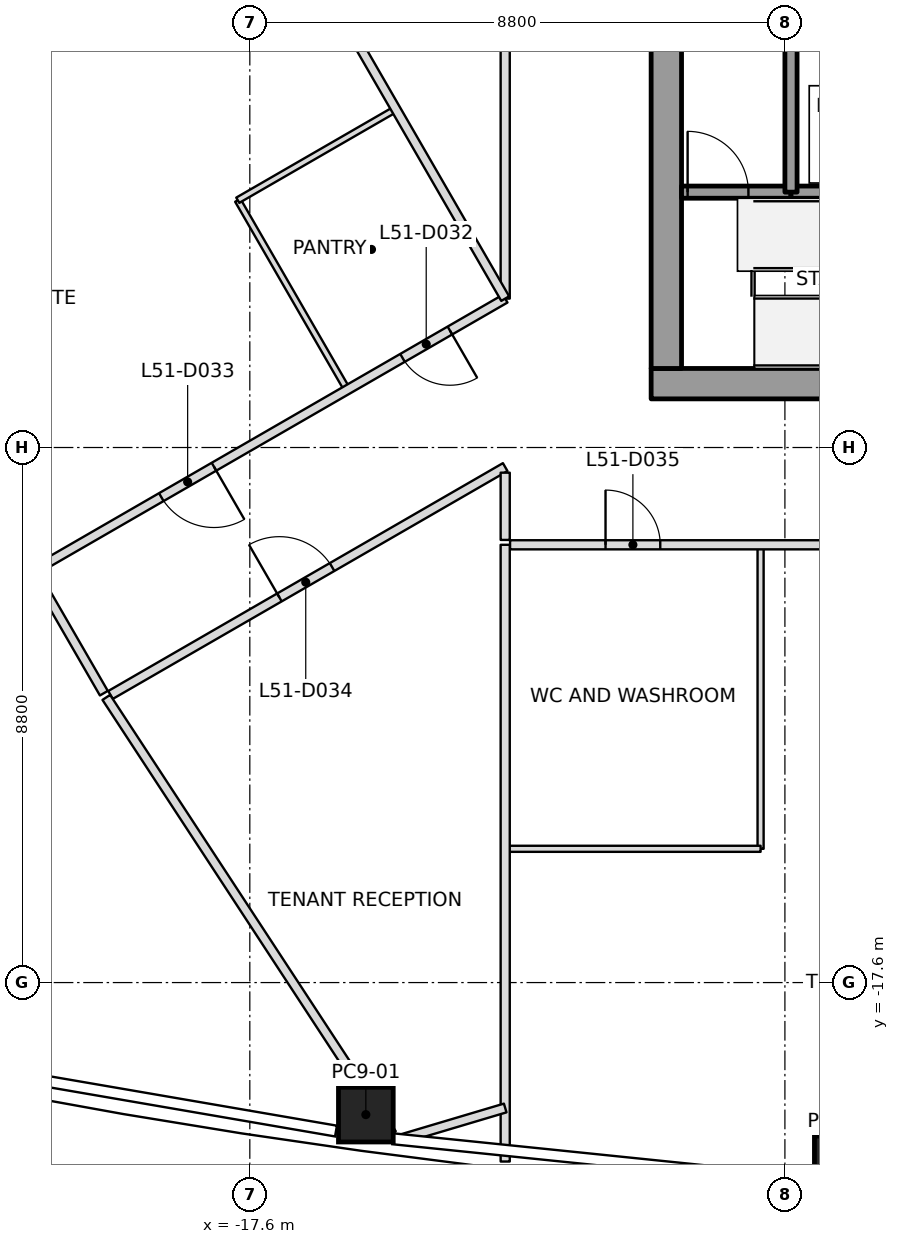
"""IFC4 building model, lengths in metres.
Left out: names, types, materials, properties, quantities, classifications, styles, units other than length and angle.
Written with IfcOpenShell. Run it as: python <this file> out.ifc"""

import sys

from ifc_helpers import new_model, si_unit, direction, frame, frame_2d, origin, origin_2d, place, context, subcontext, project, spatial, rectangle, extrude, element, fill, save


model = new_model("IFC4")
c1 = context("Model", 3, precision=1e-05, world=origin(), true_north=direction((0.0, 1.0)))
c2 = subcontext(c1, "Body", "Model", "MODEL_VIEW")
j1 = project(units=[si_unit("LENGTHUNIT", "METRE"), si_unit("PLANEANGLEUNIT", "RADIAN")], contexts=[c1])
p1 = place(None, origin())
s1 = spatial("IfcSite", under=j1, at=p1, CompositionType="ELEMENT")
p2 = place(p1, origin())
s2 = spatial("IfcBuilding", under=s1, at=p2, CompositionType="ELEMENT")
p3 = place(p2, frame((0.0, 0.0, 231.0)))
s3 = spatial("IfcBuildingStorey", under=s2, at=p3, CompositionType="ELEMENT", Elevation=231.0)
p4 = place(p3, frame((-15.692, -19.772, 0.0), z_axis=(0.017574453011, 0.010434831475, 0.999791104628), x_axis=(-0.990574210989, 0.13604032423, 0.015992582844)))
e1 = element("IfcColumn", 1, at=p4, inside=s3, PredefinedType="COLUMN", context=c2, shape_type="SweptSolid", body=[
    extrude(rectangle(XDim=0.9, YDim=0.9, at=origin_2d()), origin(), (0.0, 0.0, 1.0), 4.001),
])
p5 = place(p3, frame((-7.864, -20.575, 0.0), z_axis=(0.008788174922, 0.01116830563, 0.999899013366), x_axis=(-0.997640525567, 0.068185585075, 0.008006730567)))
e2 = element("IfcColumn", 2, at=p5, inside=s3, PredefinedType="COLUMN", context=c2, shape_type="SweptSolid", body=[
    extrude(rectangle(XDim=0.9, YDim=0.9, at=origin_2d()), origin(), (0.0, 0.0, 1.0), 4.0),
])
p6 = place(p3, frame((-11.0, -7.75, 0.0), z_axis=(0.0, 0.0, 1.0), x_axis=(1.0, 0.0, 0.0)))
e3 = element("IfcWall", 3, at=p6, inside=s3, PredefinedType="SHEAR", context=c2, shape_type="SweptSolid", body=[
    extrude(rectangle(XDim=22.0, YDim=0.5, at=frame_2d((11.0, 0.0))), origin(), (0.0, 0.0, 1.0), 4.0),
])
p7 = place(p6, frame((10.45, 0.0, 0.0)))
e4 = element("IfcOpeningElement", 4, at=p7, cuts=e3, PredefinedType="OPENING", context=c2, shape_type="SweptSolid", body=[
    extrude(rectangle(XDim=1.1, YDim=2.1, at=frame_2d((0.55, 1.05))), frame((0.0, 0.25, 0.0), z_axis=(0.0, -1.0, 0.0), x_axis=(1.0, 0.0, 0.0)), (0.0, 0.0, 1.0), 0.5),
])
p8 = place(p3, frame((-10.75, -7.5, 0.0), z_axis=(0.0, 0.0, 1.0), x_axis=(0.0, 1.0, 0.0)))
e5 = element("IfcWall", 5, at=p8, inside=s3, PredefinedType="SHEAR", context=c2, shape_type="SweptSolid", body=[
    extrude(rectangle(XDim=15.0, YDim=0.5, at=frame_2d((7.5, 0.0))), origin(), (0.0, 0.0, 1.0), 4.0),
])
p9 = place(p8, frame((6.6, 0.0, 0.0)))
e6 = element("IfcOpeningElement", 6, at=p9, cuts=e5, PredefinedType="OPENING", context=c2, shape_type="SweptSolid", body=[
    extrude(rectangle(XDim=1.8, YDim=2.1, at=frame_2d((0.9, 1.05))), frame((0.0, 0.25, 0.0), z_axis=(0.0, -1.0, 0.0), x_axis=(1.0, 0.0, 0.0)), (0.0, 0.0, 1.0), 0.5),
])
p10 = place(p3, frame((-10.5, -4.6, 0.0), z_axis=(0.0, 0.0, 1.0), x_axis=(1.0, 0.0, 0.0)))
e7 = element("IfcWall", 7, at=p10, inside=s3, PredefinedType="SOLIDWALL", context=c2, shape_type="SweptSolid", body=[
    extrude(rectangle(XDim=1.8, YDim=0.2, at=frame_2d((0.9, 0.0))), origin(), (0.0, 0.0, 1.0), 3.85),
])
p11 = place(p10, frame((0.1, 0.0, 0.0)))
e8 = element("IfcOpeningElement", 8, at=p11, cuts=e7, PredefinedType="OPENING", context=c2, shape_type="SweptSolid", body=[
    extrude(rectangle(XDim=1.0, YDim=2.1, at=frame_2d((0.5, 1.05))), frame((0.0, 0.1, 0.0), z_axis=(0.0, -1.0, 0.0), x_axis=(1.0, 0.0, 0.0)), (0.0, 0.0, 1.0), 0.2),
])
p12 = place(p3, frame((-8.7, -4.6, 0.0), z_axis=(0.0, 0.0, 1.0), x_axis=(1.0, 0.0, 0.0)))
e9 = element("IfcWall", 9, at=p12, inside=s3, PredefinedType="SOLIDWALL", context=c2, shape_type="SweptSolid", body=[
    extrude(rectangle(XDim=2.6, YDim=0.2, at=frame_2d((1.3, 0.0))), origin(), (0.0, 0.0, 1.0), 3.85),
])
p13 = place(p3, frame((-8.7, -4.6, 0.0), z_axis=(0.0, 0.0, 1.0), x_axis=(0.0, 1.0, 0.0)))
e10 = element("IfcWall", 10, at=p13, inside=s3, PredefinedType="SOLIDWALL", context=c2, shape_type="SweptSolid", body=[
    extrude(rectangle(XDim=2.8, YDim=0.2, at=frame_2d((1.4, 0.0))), origin(), (0.0, 0.0, 1.0), 3.85),
])
p14 = place(p3, frame((-13.4, -6.351, 0.0), z_axis=(0.0, 0.0, 1.0), x_axis=(-0.500006275671, 0.866021780494, 0.0)))
e11 = element("IfcWall", 11, at=p14, inside=s3, PredefinedType="PARTITIONING", context=c2, shape_type="SweptSolid", body=[
    extrude(rectangle(XDim=14.768, YDim=0.15, at=frame_2d((7.384, 0.0))), origin(), (0.0, 0.0, 1.0), 3.234),
])
p15 = place(p3, frame((-19.96, -12.91, 0.0), z_axis=(0.0, 0.0, 1.0), x_axis=(0.547697942309, -0.836676140445, 0.0)))
e12 = element("IfcWall", 12, at=p15, inside=s3, PredefinedType="PARTITIONING", context=c2, shape_type="SweptSolid", body=[
    extrude(rectangle(XDim=8.577, YDim=0.15, at=frame_2d((4.289, 0.0))), origin(), (0.0, 0.0, 1.0), 3.45),
])
p16 = place(p3, frame((-13.4, -10.4, 0.0), z_axis=(0.0, 0.0, 1.0), x_axis=(0.0, -1.0, 0.0)))
e13 = element("IfcWall", 13, at=p16, inside=s3, PredefinedType="PARTITIONING", context=c2, shape_type="SweptSolid", body=[
    extrude(rectangle(XDim=10.144, YDim=0.15, at=frame_2d((5.072, 0.0))), origin(), (0.0, 0.0, 1.0), 3.234),
])
p17 = place(p3, frame((-13.4, -19.663, 0.0), z_axis=(0.0, 0.0, 1.0), x_axis=(-0.958455635455, -0.285241642935, 0.0)))
e14 = element("IfcWall", 14, at=p17, inside=s3, PredefinedType="PARTITIONING", context=c2, shape_type="SweptSolid", body=[
    extrude(rectangle(XDim=1.787, YDim=0.15, at=frame_2d((0.894, 0.0))), origin(), (0.0, 0.0, 1.0), 3.234),
])
p18 = place(p3, frame((-21.12, -10.901, 0.0), z_axis=(0.0, 0.0, 1.0), x_axis=(0.49994888933, -0.866054910533, 0.0)))
e15 = element("IfcWall", 15, at=p18, inside=s3, PredefinedType="PARTITIONING", context=c2, shape_type="SweptSolid", body=[
    extrude(rectangle(XDim=2.24, YDim=0.15, at=frame_2d((1.12, 0.0))), origin(), (0.0, 0.0, 1.0), 3.233),
])
p19 = place(p3, frame((-13.4, -6.351, 0.0), z_axis=(0.0, 0.0, 1.0), x_axis=(-0.866028564552, -0.499994525349, 0.0)))
e16 = element("IfcWall", 16, at=p19, inside=s3, PredefinedType="PARTITIONING", context=c2, shape_type="SweptSolid", body=[
    extrude(rectangle(XDim=8.881, YDim=0.15, at=frame_2d((4.44, 0.0))), origin(), (0.0, 0.0, 1.0), 3.317),
])
p20 = place(p19, frame((1.05, 0.0, 0.0)))
e17 = element("IfcOpeningElement", 17, at=p20, cuts=e16, PredefinedType="OPENING", context=c2, shape_type="SweptSolid", body=[
    extrude(rectangle(XDim=0.9, YDim=2.1, at=frame_2d((0.45, 1.05))), frame((0.0, 0.075, 0.0), z_axis=(0.0, -1.0, 0.0), x_axis=(1.0, 0.0, 0.0)), (0.0, 0.0, 1.0), 0.15),
])
p21 = place(p19, frame((5.531, 0.0, 0.0)))
e18 = element("IfcOpeningElement", 18, at=p21, cuts=e16, PredefinedType="OPENING", context=c2, shape_type="SweptSolid", body=[
    extrude(rectangle(XDim=1.0, YDim=2.1, at=frame_2d((0.5, 1.05))), frame((0.0, 0.075, 0.0), z_axis=(0.0, -1.0, 0.0), x_axis=(1.0, 0.0, 0.0)), (0.0, 0.0, 1.0), 0.15),
])
p22 = place(p3, frame((-19.891, -12.87, 0.0), z_axis=(0.0, 0.0, 1.0), x_axis=(0.866019606374, 0.500010041276, 0.0)))
e19 = element("IfcWall", 19, at=p22, inside=s3, PredefinedType="PARTITIONING", context=c2, shape_type="SweptSolid", body=[
    extrude(rectangle(XDim=7.495, YDim=0.15, at=frame_2d((3.748, 0.0))), origin(), (0.0, 0.0, 1.0), 3.233),
])
p23 = place(p22, frame((3.208, 0.0, 0.0)))
e20 = element("IfcOpeningElement", 20, at=p23, cuts=e19, PredefinedType="OPENING", context=c2, shape_type="SweptSolid", body=[
    extrude(rectangle(XDim=1.0, YDim=2.1, at=frame_2d((0.5, 1.05))), frame((0.0, 0.075, 0.0), z_axis=(0.0, -1.0, 0.0), x_axis=(1.0, 0.0, 0.0)), (0.0, 0.0, 1.0), 0.15),
])
p24 = place(p3, frame((-13.4, -9.214, 0.0), z_axis=(0.0, 0.0, 1.0), x_axis=(0.0, -1.0, 0.0)))
e21 = element("IfcWall", 21, at=p24, inside=s3, PredefinedType="PARTITIONING", context=c2, shape_type="SweptSolid", body=[
    extrude(rectangle(XDim=1.106, YDim=0.15, at=frame_2d((0.553, 0.0))), origin(), (0.0, 0.0, 1.0), 3.233),
])
p25 = place(p3, frame((-13.4, 6.351, 0.0), z_axis=(0.0, 0.0, 1.0), x_axis=(0.0, -1.0, 0.0)))
e22 = element("IfcWall", 22, at=p25, inside=s3, PredefinedType="PARTITIONING", context=c2, shape_type="SweptSolid", body=[
    extrude(rectangle(XDim=12.702, YDim=0.15, at=frame_2d((6.351, 0.0))), origin(), (0.0, 0.0, 1.0), 3.317),
])
p26 = place(p25, frame((5.851, 0.0, 0.0)))
e23 = element("IfcOpeningElement", 23, at=p26, cuts=e22, PredefinedType="OPENING", context=c2, shape_type="SweptSolid", body=[
    extrude(rectangle(XDim=1.0, YDim=2.1, at=frame_2d((0.5, 1.05))), frame((0.0, 0.075, 0.0), z_axis=(0.0, -1.0, 0.0), x_axis=(1.0, 0.0, 0.0)), (0.0, 0.0, 1.0), 0.15),
])
p27 = place(p3, frame((-13.32, -10.4, 0.0), z_axis=(0.0, 0.0, 1.0), x_axis=(1.0, 0.0, 0.0)))
e24 = element("IfcWall", 24, at=p27, inside=s3, PredefinedType="PARTITIONING", context=c2, shape_type="SweptSolid", body=[
    extrude(rectangle(XDim=12.12, YDim=0.15, at=frame_2d((6.06, 0.0))), origin(), (0.0, 0.0, 1.0), 3.317),
])
p28 = place(p27, frame((1.57, 0.0, 0.0)))
e25 = element("IfcOpeningElement", 25, at=p28, cuts=e24, PredefinedType="OPENING", context=c2, shape_type="SweptSolid", body=[
    extrude(rectangle(XDim=0.9, YDim=2.1, at=frame_2d((0.45, 1.05))), frame((0.0, 0.075, 0.0), z_axis=(0.0, -1.0, 0.0), x_axis=(1.0, 0.0, 0.0)), (0.0, 0.0, 1.0), 0.15),
])
p29 = place(p27, frame((7.67, 0.0, 0.0)))
e26 = element("IfcOpeningElement", 26, at=p29, cuts=e24, PredefinedType="OPENING", context=c2, shape_type="SweptSolid", body=[
    extrude(rectangle(XDim=1.0, YDim=2.1, at=frame_2d((0.5, 1.05))), frame((0.0, 0.075, 0.0), z_axis=(0.0, -1.0, 0.0), x_axis=(1.0, 0.0, 0.0)), (0.0, 0.0, 1.0), 0.15),
])
p30 = place(p3, frame((-16.013, -7.825, 0.0), z_axis=(0.0, 0.0, 1.0), x_axis=(-0.499971082179, 0.866042098853, 0.0)))
e27 = element("IfcWall", 27, at=p30, inside=s3, PredefinedType="PARTITIONING", context=c2, shape_type="SweptSolid", body=[
    extrude(rectangle(XDim=3.57, YDim=0.1, at=frame_2d((1.785, 0.0))), origin(), (0.0, 0.0, 1.0), 3.317),
])
p31 = place(p3, frame((-17.798, -4.733, 0.0), z_axis=(0.0, 0.0, 1.0), x_axis=(0.866039111053, 0.499976257563, 0.0)))
e28 = element("IfcWall", 28, at=p31, inside=s3, PredefinedType="PARTITIONING", context=c2, shape_type="SweptSolid", body=[
    extrude(rectangle(XDim=2.97, YDim=0.1, at=frame_2d((1.485, 0.0))), origin(), (0.0, 0.0, 1.0), 3.317),
])
p32 = place(p3, frame((-9.2, -10.43, 0.0), z_axis=(0.0, 0.0, 1.0), x_axis=(0.0, -1.0, 0.0)))
e29 = element("IfcWall", 29, at=p32, inside=s3, PredefinedType="PARTITIONING", context=c2, shape_type="SweptSolid", body=[
    extrude(rectangle(XDim=4.97, YDim=0.1, at=frame_2d((2.485, 0.0))), origin(), (0.0, 0.0, 1.0), 3.45),
])
p33 = place(p3, frame((-9.2, -15.4, 0.0), z_axis=(0.0, 0.0, 1.0), x_axis=(-1.0, 0.0, 0.0)))
e30 = element("IfcWall", 30, at=p33, inside=s3, PredefinedType="PARTITIONING", context=c2, shape_type="SweptSolid", body=[
    extrude(rectangle(XDim=4.17, YDim=0.1, at=frame_2d((2.085, 0.0))), origin(), (0.0, 0.0, 1.0), 3.393),
])
p34 = place(p20, origin())
e31 = element("IfcDoor", 31, at=p34, inside=s3, OperationType="SINGLE_SWING_RIGHT", PredefinedType="DOOR", context=c2, shape_type="SweptSolid", body=[
    extrude(rectangle(XDim=0.9, YDim=2.1, at=frame_2d((0.45, 1.05))), frame((0.0, 0.025, 0.0), z_axis=(0.0, -1.0, 0.0), x_axis=(1.0, 0.0, 0.0)), (0.0, 0.0, 1.0), 0.05),
])
fill(e17, e31)
p35 = place(p21, origin())
e32 = element("IfcDoor", 32, at=p35, inside=s3, OperationType="SINGLE_SWING_RIGHT", PredefinedType="DOOR", context=c2, shape_type="SweptSolid", body=[
    extrude(rectangle(XDim=1.0, YDim=2.1, at=frame_2d((0.5, 1.05))), frame((0.0, 0.025, 0.0), z_axis=(0.0, -1.0, 0.0), x_axis=(1.0, 0.0, 0.0)), (0.0, 0.0, 1.0), 0.05),
])
fill(e18, e32)
p36 = place(p23, origin())
e33 = element("IfcDoor", 33, at=p36, inside=s3, OperationType="SINGLE_SWING_LEFT", PredefinedType="DOOR", context=c2, shape_type="SweptSolid", body=[
    extrude(rectangle(XDim=1.0, YDim=2.1, at=frame_2d((0.5, 1.05))), frame((0.0, 0.025, 0.0), z_axis=(0.0, -1.0, 0.0), x_axis=(1.0, 0.0, 0.0)), (0.0, 0.0, 1.0), 0.05),
])
fill(e20, e33)
p37 = place(p28, origin())
e34 = element("IfcDoor", 34, at=p37, inside=s3, OperationType="SINGLE_SWING_LEFT", PredefinedType="DOOR", context=c2, shape_type="SweptSolid", body=[
    extrude(rectangle(XDim=0.9, YDim=2.1, at=frame_2d((0.45, 1.05))), frame((0.0, 0.025, 0.0), z_axis=(0.0, -1.0, 0.0), x_axis=(1.0, 0.0, 0.0)), (0.0, 0.0, 1.0), 0.05),
])
fill(e25, e34)
p38 = place(p11, origin())
e35 = element("IfcDoor", 35, at=p38, inside=s3, OperationType="SINGLE_SWING_LEFT", PredefinedType="DOOR", context=c2, shape_type="SweptSolid", body=[
    extrude(rectangle(XDim=1.0, YDim=2.1, at=frame_2d((0.5, 1.05))), frame((0.0, 0.025, 0.0), z_axis=(0.0, -1.0, 0.0), x_axis=(1.0, 0.0, 0.0)), (0.0, 0.0, 1.0), 0.05),
])
fill(e8, e35)
save(model, sys.argv[1])
